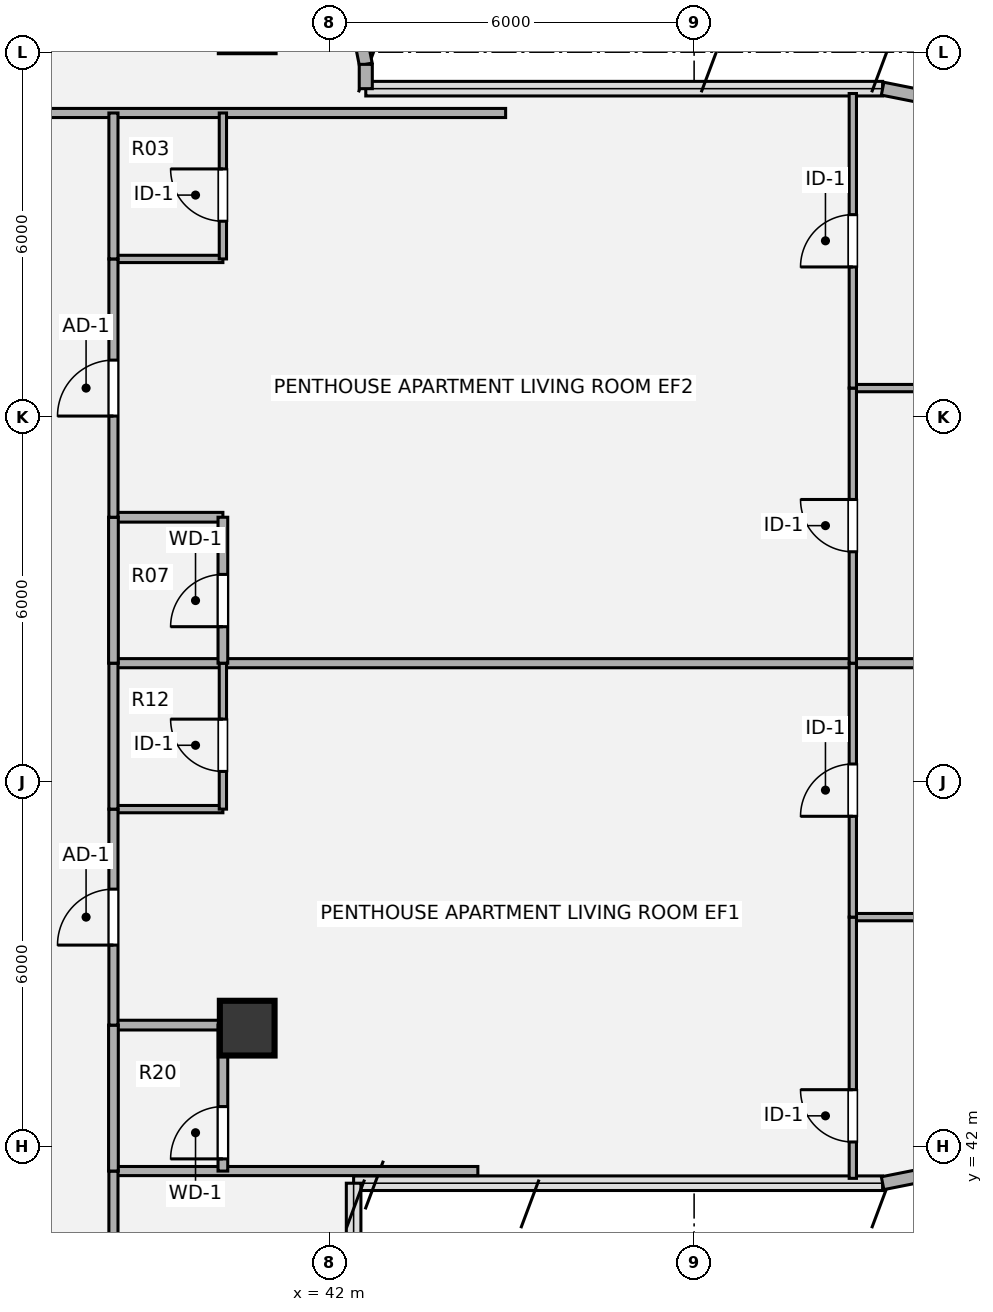
"""IFC4 building model, lengths in metres.
Left out: names, types, materials, properties, quantities, classifications, styles, units other than length and angle.
Written with IfcOpenShell. Run it as: python <this file> out.ifc"""

import sys

from ifc_helpers import new_model, si_unit, direction, frame, frame_2d, origin, origin_2d, place, context, subcontext, project, spatial, rectangle, hollow_circle, extrude, source, transform, mapped, element, fill, save


model = new_model("IFC4")
c1 = context("Model", 3, precision=1e-05, world=origin(), true_north=direction((0.0, 1.0)))
c2 = subcontext(c1, "Body", "Model", "MODEL_VIEW")
j1 = project(units=[si_unit("LENGTHUNIT", "METRE"), si_unit("PLANEANGLEUNIT", "RADIAN")], contexts=[c1])
p1 = place(None, origin())
s1 = spatial("IfcSite", under=j1, at=p1, CompositionType="ELEMENT")
p2 = place(p1, origin())
s2 = spatial("IfcBuilding", under=s1, at=p2, CompositionType="ELEMENT")
p3 = place(p2, frame((0.0, 0.0, 226.8)))
s3 = spatial("IfcBuildingStorey", under=s2, at=p3, CompositionType="ELEMENT", Elevation=226.8)
m1 = source(origin(), c2, "Body", "SweptSolid", [
    extrude(hollow_circle(Radius=0.45, WallThickness=0.032, at=origin_2d()), origin(), (0.0, 0.0, 1.0), 3.78),
])
p4 = place(p3, frame((40.65, 43.95, 0.0), z_axis=(0.0, 0.0, 1.0), x_axis=(1.0, 0.0, 0.0)))
e1 = element("IfcColumn", 1, at=p4, inside=s3, PredefinedType="COLUMN", context=c2, shape_type="MappedRepresentation", body=[
    mapped(m1, transform((0.0, 0.0, 0.0), x_axis=(1.0, 0.0, 0.0), y_axis=(0.0, 1.0, 0.0), z_axis=(0.0, 0.0, 1.0), scale=1.0)),
])
p5 = place(p3, frame((42.402, 60.795, 0.0), z_axis=(0.0, 0.0, 1.0), x_axis=(0.195190360752, -0.980765376158, 0.0)))
e2 = element("IfcWall", 2, at=p5, inside=s3, PredefinedType="SOLIDWALL", context=c2, shape_type="SweptSolid", body=[
    extrude(rectangle(XDim=1.014, YDim=0.215, at=frame_2d((0.507, 0.0))), origin(), (0.0, 0.0, 1.0), 3.53),
])
p6 = place(p3, frame((42.6, 59.8, 0.0), z_axis=(0.0, 0.0, 1.0), x_axis=(0.0, -1.0, 0.0)))
e3 = element("IfcWall", 3, at=p6, inside=s3, PredefinedType="SOLIDWALL", context=c2, shape_type="SweptSolid", body=[
    extrude(rectangle(XDim=0.4, YDim=0.215, at=frame_2d((0.2, 0.0))), origin(), (0.0, 0.0, 1.0), 3.53),
])
for number, where, z_axis, x_axis in (
    (4, (51.1, 59.4, 0.0), (0.0, 0.0, 1.0), (0.981, -0.195, 0.0)),
    (5, (52.325, 41.644, 0.0), (0.0, 0.0, 1.0), (-0.981, -0.195, 0.0)),
):
    element("IfcWall", number, at=place(p3, frame(where, z_axis=z_axis, x_axis=x_axis)), inside=s3, PredefinedType="SOLIDWALL", context=c2, shape_type="SweptSolid", body=[
        extrude(rectangle(XDim=1.249, YDim=0.215, at=frame_2d((0.624, 0.0))), origin(), (0.0, 0.0, 1.0), 3.53),
    ])
p7 = place(p3, frame((38.45, 41.6, 0.0), z_axis=(0.0, 0.0, 1.0), x_axis=(1.0, 0.0, 0.0)))
e6 = element("IfcWall", 6, at=p7, inside=s3, PredefinedType="PARTITIONING", context=c2, shape_type="SweptSolid", body=[
    extrude(rectangle(XDim=5.993, YDim=0.15, at=frame_2d((2.997, 0.0))), origin(), (0.0, 0.0, 1.0), 3.5),
])
p8 = place(p3, frame((38.45, 44.0, 0.0), z_axis=(0.0, 0.0, 1.0), x_axis=(1.0, 0.0, 0.0)))
e7 = element("IfcWall", 7, at=p8, inside=s3, PredefinedType="PLUMBINGWALL", context=c2, shape_type="SweptSolid", body=[
    extrude(rectangle(XDim=1.8, YDim=0.16, at=frame_2d((0.9, 0.0))), origin(), (0.0, 0.0, 1.0), 2.903),
])
p9 = place(p3, frame((50.61, 45.776, 0.0), z_axis=(0.0, 0.0, 1.0), x_axis=(1.0, 0.0, 0.0)))
e8 = element("IfcWall", 8, at=p9, inside=s3, PredefinedType="PARTITIONING", context=c2, shape_type="SweptSolid", body=[
    extrude(rectangle(XDim=3.61, YDim=0.12, at=frame_2d((1.805, 0.0))), origin(), (0.0, 0.0, 1.0), 2.982),
])
p10 = place(p3, frame((38.45, 47.552, 0.0), z_axis=(0.0, 0.0, 1.0), x_axis=(1.0, 0.0, 0.0)))
e9 = element("IfcWall", 9, at=p10, inside=s3, PredefinedType="PARTITIONING", context=c2, shape_type="SweptSolid", body=[
    extrude(rectangle(XDim=1.8, YDim=0.12, at=frame_2d((0.9, 0.0))), origin(), (0.0, 0.0, 1.0), 3.259),
])
p11 = place(p3, frame((38.45, 49.952, 0.0), z_axis=(0.0, 0.0, 1.0), x_axis=(1.0, 0.0, 0.0)))
e10 = element("IfcWall", 10, at=p11, inside=s3, PredefinedType="PARTITIONING", context=c2, shape_type="SweptSolid", body=[
    extrude(rectangle(XDim=15.77, YDim=0.15, at=frame_2d((7.885, 0.0))), origin(), (0.0, 0.0, 1.0), 2.982),
])
p12 = place(p3, frame((38.45, 52.352, 0.0), z_axis=(0.0, 0.0, 1.0), x_axis=(1.0, 0.0, 0.0)))
e11 = element("IfcWall", 11, at=p12, inside=s3, PredefinedType="PLUMBINGWALL", context=c2, shape_type="SweptSolid", body=[
    extrude(rectangle(XDim=1.8, YDim=0.16, at=frame_2d((0.9, 0.0))), origin(), (0.0, 0.0, 1.0), 3.259),
])
p13 = place(p3, frame((50.61, 54.476, 0.0), z_axis=(0.0, 0.0, 1.0), x_axis=(1.0, 0.0, 0.0)))
e12 = element("IfcWall", 12, at=p13, inside=s3, PredefinedType="PARTITIONING", context=c2, shape_type="SweptSolid", body=[
    extrude(rectangle(XDim=3.61, YDim=0.12, at=frame_2d((1.805, 0.0))), origin(), (0.0, 0.0, 1.0), 2.903),
])
p14 = place(p3, frame((38.45, 56.6, 0.0), z_axis=(0.0, 0.0, 1.0), x_axis=(1.0, 0.0, 0.0)))
e13 = element("IfcWall", 13, at=p14, inside=s3, PredefinedType="PARTITIONING", context=c2, shape_type="SweptSolid", body=[
    extrude(rectangle(XDim=1.8, YDim=0.12, at=frame_2d((0.9, 0.0))), origin(), (0.0, 0.0, 1.0), 3.259),
])
p15 = place(p3, frame((27.1, 59.0, 0.0), z_axis=(0.0, 0.0, 1.0), x_axis=(1.0, 0.0, 0.0)))
e14 = element("IfcWall", 14, at=p15, inside=s3, PredefinedType="PARTITIONING", context=c2, shape_type="SweptSolid", body=[
    extrude(rectangle(XDim=17.8, YDim=0.15, at=frame_2d((8.9, 0.0))), origin(), (0.0, 0.0, 1.0), 3.308),
])
p16 = place(p15, frame((8.375, 0.0, 0.0)))
e15 = element("IfcOpeningElement", 15, at=p16, cuts=e14, PredefinedType="OPENING", context=c2, shape_type="SweptSolid", body=[
    extrude(rectangle(XDim=1.05, YDim=2.1, at=origin_2d()), frame((0.525, 0.085, 1.05), z_axis=(0.0, -1.0, 0.0), x_axis=(1.0, 0.0, 0.0)), (0.0, 0.0, 1.0), 0.17),
])
p17 = place(p3, frame((38.45, 22.4, 0.0), z_axis=(0.0, 0.0, 1.0), x_axis=(0.0, 1.0, 0.0)))
e16 = element("IfcWall", 16, at=p17, inside=s3, PredefinedType="PARTITIONING", context=c2, shape_type="SweptSolid", body=[
    extrude(rectangle(XDim=19.2, YDim=0.15, at=frame_2d((9.6, 0.0))), origin(), (0.0, 0.0, 1.0), 3.5),
])
p18 = place(p17, frame((8.975, 0.0, 0.0)))
e17 = element("IfcOpeningElement", 17, at=p18, cuts=e16, PredefinedType="OPENING", context=c2, shape_type="SweptSolid", body=[
    extrude(rectangle(XDim=1.05, YDim=2.1, at=origin_2d()), frame((0.525, 0.085, 1.05), z_axis=(0.0, -1.0, 0.0), x_axis=(1.0, 0.0, 0.0)), (0.0, 0.0, 1.0), 0.17),
])
p19 = place(p3, frame((38.45, 41.6, 0.0), z_axis=(0.0, 0.0, 1.0), x_axis=(0.0, 1.0, 0.0)))
e18 = element("IfcWall", 18, at=p19, inside=s3, PredefinedType="PLUMBINGWALL", context=c2, shape_type="SweptSolid", body=[
    extrude(rectangle(XDim=2.4, YDim=0.16, at=frame_2d((1.2, 0.0))), origin(), (0.0, 0.0, 1.0), 3.5),
])
p20 = place(p3, frame((38.45, 44.0, 0.0), z_axis=(0.0, 0.0, 1.0), x_axis=(0.0, 1.0, 0.0)))
e19 = element("IfcWall", 19, at=p20, inside=s3, PredefinedType="PARTITIONING", context=c2, shape_type="SweptSolid", body=[
    extrude(rectangle(XDim=3.552, YDim=0.15, at=frame_2d((1.776, 0.0))), origin(), (0.0, 0.0, 1.0), 3.5),
])
p21 = place(p20, frame((1.316, 0.0, 0.0)))
e20 = element("IfcOpeningElement", 20, at=p21, cuts=e19, PredefinedType="OPENING", context=c2, shape_type="SweptSolid", body=[
    extrude(rectangle(XDim=0.92, YDim=2.1, at=origin_2d()), frame((0.46, 0.085, 1.05), z_axis=(0.0, -1.0, 0.0), x_axis=(1.0, 0.0, 0.0)), (0.0, 0.0, 1.0), 0.17),
])
p22 = place(p3, frame((38.45, 47.552, 0.0), z_axis=(0.0, 0.0, 1.0), x_axis=(0.0, 1.0, 0.0)))
e21 = element("IfcWall", 21, at=p22, inside=s3, PredefinedType="PARTITIONING", context=c2, shape_type="SweptSolid", body=[
    extrude(rectangle(XDim=2.4, YDim=0.15, at=frame_2d((1.2, 0.0))), origin(), (0.0, 0.0, 1.0), 3.5),
])
p23 = place(p3, frame((38.45, 49.952, 0.0), z_axis=(0.0, 0.0, 1.0), x_axis=(0.0, 1.0, 0.0)))
e22 = element("IfcWall", 22, at=p23, inside=s3, PredefinedType="PLUMBINGWALL", context=c2, shape_type="SweptSolid", body=[
    extrude(rectangle(XDim=2.4, YDim=0.16, at=frame_2d((1.2, 0.0))), origin(), (0.0, 0.0, 1.0), 3.5),
])
p24 = place(p3, frame((38.45, 52.352, 0.0), z_axis=(0.0, 0.0, 1.0), x_axis=(0.0, 1.0, 0.0)))
e23 = element("IfcWall", 23, at=p24, inside=s3, PredefinedType="PARTITIONING", context=c2, shape_type="SweptSolid", body=[
    extrude(rectangle(XDim=4.248, YDim=0.15, at=frame_2d((2.124, 0.0))), origin(), (0.0, 0.0, 1.0), 3.5),
])
p25 = place(p24, frame((1.664, 0.0, 0.0)))
e24 = element("IfcOpeningElement", 24, at=p25, cuts=e23, PredefinedType="OPENING", context=c2, shape_type="SweptSolid", body=[
    extrude(rectangle(XDim=0.92, YDim=2.1, at=origin_2d()), frame((0.46, 0.085, 1.05), z_axis=(0.0, -1.0, 0.0), x_axis=(1.0, 0.0, 0.0)), (0.0, 0.0, 1.0), 0.17),
])
p26 = place(p3, frame((38.45, 56.6, 0.0), z_axis=(0.0, 0.0, 1.0), x_axis=(0.0, 1.0, 0.0)))
e25 = element("IfcWall", 25, at=p26, inside=s3, PredefinedType="PARTITIONING", context=c2, shape_type="SweptSolid", body=[
    extrude(rectangle(XDim=2.4, YDim=0.15, at=frame_2d((1.2, 0.0))), origin(), (0.0, 0.0, 1.0), 3.5),
])
p27 = place(p3, frame((40.25, 41.6, 0.0), z_axis=(0.0, 0.0, 1.0), x_axis=(0.0, 1.0, 0.0)))
e26 = element("IfcWall", 26, at=p27, inside=s3, PredefinedType="PLUMBINGWALL", context=c2, shape_type="SweptSolid", body=[
    extrude(rectangle(XDim=2.4, YDim=0.16, at=frame_2d((1.2, 0.0))), origin(), (0.0, 0.0, 1.0), 3.5),
])
p28 = place(p27, frame((0.2, 0.0, 0.0)))
e27 = element("IfcOpeningElement", 27, at=p28, cuts=e26, PredefinedType="OPENING", context=c2, shape_type="SweptSolid", body=[
    extrude(rectangle(XDim=0.86, YDim=2.1, at=origin_2d()), frame((0.43, 0.09, 1.05), z_axis=(0.0, -1.0, 0.0), x_axis=(1.0, 0.0, 0.0)), (0.0, 0.0, 1.0), 0.18),
])
p29 = place(p3, frame((40.25, 47.552, 0.0), z_axis=(0.0, 0.0, 1.0), x_axis=(0.0, 1.0, 0.0)))
e28 = element("IfcWall", 28, at=p29, inside=s3, PredefinedType="PARTITIONING", context=c2, shape_type="SweptSolid", body=[
    extrude(rectangle(XDim=2.4, YDim=0.12, at=frame_2d((1.2, 0.0))), origin(), (0.0, 0.0, 1.0), 3.5),
])
p30 = place(p29, frame((0.62, 0.0, 0.0)))
e29 = element("IfcOpeningElement", 29, at=p30, cuts=e28, PredefinedType="OPENING", context=c2, shape_type="SweptSolid", body=[
    extrude(rectangle(XDim=0.86, YDim=2.1, at=origin_2d()), frame((0.43, 0.07, 1.05), z_axis=(0.0, -1.0, 0.0), x_axis=(1.0, 0.0, 0.0)), (0.0, 0.0, 1.0), 0.14),
])
p31 = place(p3, frame((40.25, 49.952, 0.0), z_axis=(0.0, 0.0, 1.0), x_axis=(0.0, 1.0, 0.0)))
e30 = element("IfcWall", 30, at=p31, inside=s3, PredefinedType="PLUMBINGWALL", context=c2, shape_type="SweptSolid", body=[
    extrude(rectangle(XDim=2.4, YDim=0.16, at=frame_2d((1.2, 0.0))), origin(), (0.0, 0.0, 1.0), 3.5),
])
p32 = place(p31, frame((0.6, 0.0, 0.0)))
e31 = element("IfcOpeningElement", 31, at=p32, cuts=e30, PredefinedType="OPENING", context=c2, shape_type="SweptSolid", body=[
    extrude(rectangle(XDim=0.86, YDim=2.1, at=origin_2d()), frame((0.43, 0.09, 1.05), z_axis=(0.0, -1.0, 0.0), x_axis=(1.0, 0.0, 0.0)), (0.0, 0.0, 1.0), 0.18),
])
p33 = place(p3, frame((40.25, 56.6, 0.0), z_axis=(0.0, 0.0, 1.0), x_axis=(0.0, 1.0, 0.0)))
e32 = element("IfcWall", 32, at=p33, inside=s3, PredefinedType="PARTITIONING", context=c2, shape_type="SweptSolid", body=[
    extrude(rectangle(XDim=2.4, YDim=0.12, at=frame_2d((1.2, 0.0))), origin(), (0.0, 0.0, 1.0), 3.5),
])
p34 = place(p33, frame((0.62, 0.0, 0.0)))
e33 = element("IfcOpeningElement", 33, at=p34, cuts=e32, PredefinedType="OPENING", context=c2, shape_type="SweptSolid", body=[
    extrude(rectangle(XDim=0.86, YDim=2.1, at=origin_2d()), frame((0.43, 0.07, 1.05), z_axis=(0.0, -1.0, 0.0), x_axis=(1.0, 0.0, 0.0)), (0.0, 0.0, 1.0), 0.14),
])
p35 = place(p3, frame((50.61, 41.48, 0.0), z_axis=(0.0, 0.0, 1.0), x_axis=(0.0, 1.0, 0.0)))
e34 = element("IfcWall", 34, at=p35, inside=s3, PredefinedType="PARTITIONING", context=c2, shape_type="SweptSolid", body=[
    extrude(rectangle(XDim=4.296, YDim=0.12, at=frame_2d((2.148, 0.0))), origin(), (0.0, 0.0, 1.0), 3.5),
])
p36 = place(p35, frame((0.598, 0.0, 0.0)))
e35 = element("IfcOpeningElement", 35, at=p36, cuts=e34, PredefinedType="OPENING", context=c2, shape_type="SweptSolid", body=[
    extrude(rectangle(XDim=0.86, YDim=2.1, at=origin_2d()), frame((0.43, 0.07, 1.05), z_axis=(0.0, -1.0, 0.0), x_axis=(1.0, 0.0, 0.0)), (0.0, 0.0, 1.0), 0.14),
])
p37 = place(p3, frame((50.61, 45.776, 0.0), z_axis=(0.0, 0.0, 1.0), x_axis=(0.0, 1.0, 0.0)))
e36 = element("IfcWall", 36, at=p37, inside=s3, PredefinedType="PARTITIONING", context=c2, shape_type="SweptSolid", body=[
    extrude(rectangle(XDim=4.176, YDim=0.12, at=frame_2d((2.088, 0.0))), origin(), (0.0, 0.0, 1.0), 3.5),
])
p38 = place(p37, frame((1.658, 0.0, 0.0)))
e37 = element("IfcOpeningElement", 37, at=p38, cuts=e36, PredefinedType="OPENING", context=c2, shape_type="SweptSolid", body=[
    extrude(rectangle(XDim=0.86, YDim=2.1, at=origin_2d()), frame((0.43, 0.07, 1.05), z_axis=(0.0, -1.0, 0.0), x_axis=(1.0, 0.0, 0.0)), (0.0, 0.0, 1.0), 0.14),
])
p39 = place(p3, frame((50.61, 49.952, 0.0), z_axis=(0.0, 0.0, 1.0), x_axis=(0.0, 1.0, 0.0)))
e38 = element("IfcWall", 38, at=p39, inside=s3, PredefinedType="PARTITIONING", context=c2, shape_type="SweptSolid", body=[
    extrude(rectangle(XDim=4.524, YDim=0.12, at=frame_2d((2.262, 0.0))), origin(), (0.0, 0.0, 1.0), 3.5),
])
p40 = place(p39, frame((1.832, 0.0, 0.0)))
e39 = element("IfcOpeningElement", 39, at=p40, cuts=e38, PredefinedType="OPENING", context=c2, shape_type="SweptSolid", body=[
    extrude(rectangle(XDim=0.86, YDim=2.1, at=origin_2d()), frame((0.43, 0.07, 1.05), z_axis=(0.0, -1.0, 0.0), x_axis=(1.0, 0.0, 0.0)), (0.0, 0.0, 1.0), 0.14),
])
p41 = place(p3, frame((50.61, 54.476, 0.0), z_axis=(0.0, 0.0, 1.0), x_axis=(0.0, 1.0, 0.0)))
e40 = element("IfcWall", 40, at=p41, inside=s3, PredefinedType="PARTITIONING", context=c2, shape_type="SweptSolid", body=[
    extrude(rectangle(XDim=4.844, YDim=0.12, at=frame_2d((2.422, 0.0))), origin(), (0.0, 0.0, 1.0), 3.5),
])
p42 = place(p41, frame((1.992, 0.0, 0.0)))
e41 = element("IfcOpeningElement", 41, at=p42, cuts=e40, PredefinedType="OPENING", context=c2, shape_type="SweptSolid", body=[
    extrude(rectangle(XDim=0.86, YDim=2.1, at=origin_2d()), frame((0.43, 0.07, 1.05), z_axis=(0.0, -1.0, 0.0), x_axis=(1.0, 0.0, 0.0)), (0.0, 0.0, 1.0), 0.14),
])
m2 = source(origin(), c2, "Body", "SweptSolid", [
    extrude(rectangle(XDim=0.92, YDim=2.1, at=origin_2d()), frame((0.46, 0.025, 1.05), z_axis=(0.0, -1.0, 0.0), x_axis=(1.0, 0.0, 0.0)), (0.0, 0.0, 1.0), 0.05),
])
p43 = place(p21, origin())
e42 = element("IfcDoor", 42, at=p43, inside=s3, OperationType="SINGLE_SWING_LEFT", PredefinedType="DOOR", context=c2, shape_type="MappedRepresentation", body=[
    mapped(m2, transform((0.0, 0.0, 0.0), x_axis=(1.0, 0.0, 0.0), y_axis=(0.0, 1.0, 0.0), z_axis=(0.0, 0.0, 1.0), scale=1.0)),
])
fill(e20, e42)
p44 = place(p25, origin())
e43 = element("IfcDoor", 43, at=p44, inside=s3, OperationType="SINGLE_SWING_LEFT", PredefinedType="DOOR", context=c2, shape_type="MappedRepresentation", body=[
    mapped(m2, transform((0.0, 0.0, 0.0), x_axis=(1.0, 0.0, 0.0), y_axis=(0.0, 1.0, 0.0), z_axis=(0.0, 0.0, 1.0), scale=1.0)),
])
fill(e24, e43)
m3 = source(origin(), c2, "Body", "SweptSolid", [
    extrude(rectangle(XDim=0.86, YDim=2.1, at=origin_2d()), frame((0.43, 0.025, 1.05), z_axis=(0.0, -1.0, 0.0), x_axis=(1.0, 0.0, 0.0)), (0.0, 0.0, 1.0), 0.05),
])
p45 = place(p28, origin())
e44 = element("IfcDoor", 44, at=p45, inside=s3, OperationType="SINGLE_SWING_LEFT", PredefinedType="DOOR", context=c2, shape_type="MappedRepresentation", body=[
    mapped(m3, transform((0.0, 0.0, 0.0), x_axis=(1.0, 0.0, 0.0), y_axis=(0.0, 1.0, 0.0), z_axis=(0.0, 0.0, 1.0), scale=1.0)),
])
fill(e27, e44)
m4 = source(origin(), c2, "Body", "SweptSolid", [
    extrude(rectangle(XDim=0.86, YDim=2.1, at=origin_2d()), frame((0.43, 0.025, 1.05), z_axis=(0.0, -1.0, 0.0), x_axis=(1.0, 0.0, 0.0)), (0.0, 0.0, 1.0), 0.05),
])
p46 = place(p30, origin())
e45 = element("IfcDoor", 45, at=p46, inside=s3, OperationType="SINGLE_SWING_RIGHT", PredefinedType="DOOR", context=c2, shape_type="MappedRepresentation", body=[
    mapped(m4, transform((0.0, 0.0, 0.0), x_axis=(1.0, 0.0, 0.0), y_axis=(0.0, 1.0, 0.0), z_axis=(0.0, 0.0, 1.0), scale=1.0)),
])
fill(e29, e45)
p47 = place(p32, origin())
e46 = element("IfcDoor", 46, at=p47, inside=s3, OperationType="SINGLE_SWING_LEFT", PredefinedType="DOOR", context=c2, shape_type="MappedRepresentation", body=[
    mapped(m3, transform((0.0, 0.0, 0.0), x_axis=(1.0, 0.0, 0.0), y_axis=(0.0, 1.0, 0.0), z_axis=(0.0, 0.0, 1.0), scale=1.0)),
])
fill(e31, e46)
p48 = place(p34, origin())
e47 = element("IfcDoor", 47, at=p48, inside=s3, OperationType="SINGLE_SWING_RIGHT", PredefinedType="DOOR", context=c2, shape_type="MappedRepresentation", body=[
    mapped(m4, transform((0.0, 0.0, 0.0), x_axis=(1.0, 0.0, 0.0), y_axis=(0.0, 1.0, 0.0), z_axis=(0.0, 0.0, 1.0), scale=1.0)),
])
fill(e33, e47)
p49 = place(p36, origin())
e48 = element("IfcDoor", 48, at=p49, inside=s3, OperationType="SINGLE_SWING_RIGHT", PredefinedType="DOOR", context=c2, shape_type="MappedRepresentation", body=[
    mapped(m4, transform((0.0, 0.0, 0.0), x_axis=(1.0, 0.0, 0.0), y_axis=(0.0, 1.0, 0.0), z_axis=(0.0, 0.0, 1.0), scale=1.0)),
])
fill(e35, e48)
p50 = place(p38, origin())
e49 = element("IfcDoor", 49, at=p50, inside=s3, OperationType="SINGLE_SWING_LEFT", PredefinedType="DOOR", context=c2, shape_type="MappedRepresentation", body=[
    mapped(m4, transform((0.0, 0.0, 0.0), x_axis=(1.0, 0.0, 0.0), y_axis=(0.0, 1.0, 0.0), z_axis=(0.0, 0.0, 1.0), scale=1.0)),
])
fill(e37, e49)
p51 = place(p40, origin())
e50 = element("IfcDoor", 50, at=p51, inside=s3, OperationType="SINGLE_SWING_RIGHT", PredefinedType="DOOR", context=c2, shape_type="MappedRepresentation", body=[
    mapped(m4, transform((0.0, 0.0, 0.0), x_axis=(1.0, 0.0, 0.0), y_axis=(0.0, 1.0, 0.0), z_axis=(0.0, 0.0, 1.0), scale=1.0)),
])
fill(e39, e50)
p52 = place(p42, origin())
e51 = element("IfcDoor", 51, at=p52, inside=s3, OperationType="SINGLE_SWING_LEFT", PredefinedType="DOOR", context=c2, shape_type="MappedRepresentation", body=[
    mapped(m4, transform((0.0, 0.0, 0.0), x_axis=(1.0, 0.0, 0.0), y_axis=(0.0, 1.0, 0.0), z_axis=(0.0, 0.0, 1.0), scale=1.0)),
])
fill(e41, e51)
save(model, sys.argv[1])
